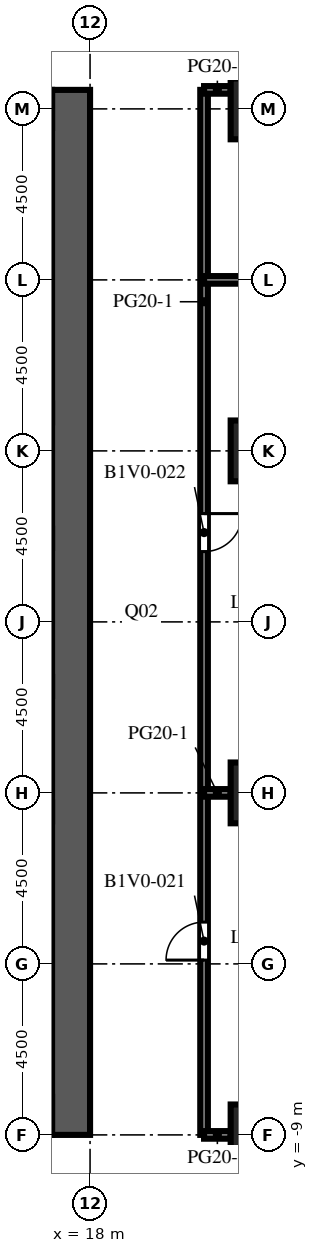
"""IFC4 building model, lengths in metres.
Left out: names, types, materials, properties, quantities, classifications, styles, units other than length and angle.
Written with IfcOpenShell. Run it as: python <this file> out.ifc"""

import sys

from ifc_helpers import new_model, si_unit, direction, frame, frame_2d, origin, origin_2d, place, context, subcontext, project, spatial, rectangle, extrude, element, fill, save


model = new_model("IFC4")
c1 = context("Model", 3, precision=1e-05, world=origin(), true_north=direction((0.0, 1.0)))
c2 = subcontext(c1, "Body", "Model", "MODEL_VIEW")
j1 = project(units=[si_unit("LENGTHUNIT", "METRE"), si_unit("PLANEANGLEUNIT", "RADIAN")], contexts=[c1])
p1 = place(None, origin())
s1 = spatial("IfcSite", under=j1, at=p1, CompositionType="ELEMENT")
p2 = place(p1, origin())
s2 = spatial("IfcBuilding", under=s1, at=p2, CompositionType="ELEMENT")
p3 = place(p2, frame((0.0, 0.0, 15.4)))
s3 = spatial("IfcBuildingStorey", under=s2, at=p3, CompositionType="ELEMENT", Elevation=15.4)
for number, where, z_axis, x_axis in (
    (1, (22.5, -9.0, 0.0), (0.0, 0.0, 1.0), (1.0, 0.0, 0.0)),
    (2, (22.5, 0.0, 0.0), (0.0, 0.0, 1.0), (1.0, 0.0, 0.0)),
    (3, (22.5, 9.0, 0.0), (0.0, 0.0, 1.0), (1.0, 0.0, 0.0)),
    (4, (22.5, 18.0, 0.0), (0.0, 0.0, 1.0), (1.0, 0.0, 0.0)),
):
    element("IfcColumn", number, at=place(p3, frame(where, z_axis=z_axis, x_axis=x_axis)), inside=s3, PredefinedType="COLUMN", context=c2, shape_type="SweptSolid", body=[
        extrude(rectangle(XDim=1.6, YDim=1.6, at=origin_2d()), origin(), (0.0, 0.0, 1.0), 4.1),
    ])
p4 = place(p3, frame((17.5, -9.0, 0.0), z_axis=(0.0, 0.0, 1.0), x_axis=(0.0, 1.0, 0.0)))
e5 = element("IfcWall", 5, at=p4, inside=s3, PredefinedType="SHEAR", context=c2, shape_type="SweptSolid", body=[
    extrude(rectangle(XDim=27.5, YDim=1.0, at=frame_2d((13.75, 0.0))), origin(), (0.0, 0.0, 1.0), 4.1),
])
p5 = place(p4, frame((12.55, 0.0, 0.0)))
e6 = element("IfcOpeningElement", 6, at=p5, cuts=e5, PredefinedType="OPENING", context=c2, shape_type="SweptSolid", body=[
    extrude(rectangle(XDim=2.4, YDim=2.4, at=frame_2d((1.2, 1.2))), frame((0.0, 0.51, 0.0), z_axis=(0.0, -1.0, 0.0), x_axis=(1.0, 0.0, 0.0)), (0.0, 0.0, 1.0), 1.02),
])
p6 = place(p4, frame((6.825, 0.0, 0.0)))
e7 = element("IfcOpeningElement", 7, at=p6, cuts=e5, PredefinedType="OPENING", context=c2, shape_type="SweptSolid", body=[
    extrude(rectangle(XDim=1.2, YDim=2.1, at=frame_2d((0.6, 1.05))), frame((0.0, 0.51, 0.0), z_axis=(0.0, -1.0, 0.0), x_axis=(1.0, 0.0, 0.0)), (0.0, 0.0, 1.0), 1.02),
])
p7 = place(p4, frame((19.475, 0.0, 0.0)))
e8 = element("IfcOpeningElement", 8, at=p7, cuts=e5, PredefinedType="OPENING", context=c2, shape_type="SweptSolid", body=[
    extrude(rectangle(XDim=1.2, YDim=2.1, at=frame_2d((0.6, 1.05))), frame((0.0, 0.51, 0.0), z_axis=(0.0, -1.0, 0.0), x_axis=(1.0, 0.0, 0.0)), (0.0, 0.0, 1.0), 1.02),
])
p8 = place(p3, frame((21.0, 18.5, 0.0), z_axis=(0.0, 0.0, 1.0), x_axis=(0.0, -1.0, 0.0)))
e9 = element("IfcWall", 9, at=p8, inside=s3, PredefinedType="PARTITIONING", context=c2, shape_type="SweptSolid", body=[
    extrude(rectangle(XDim=27.5, YDim=0.2, at=frame_2d((13.75, 0.0))), origin(), (0.0, 0.0, 1.0), 3.65),
])
p9 = place(p8, frame((21.9, 0.0, 0.0)))
e10 = element("IfcOpeningElement", 10, at=p9, cuts=e9, PredefinedType="OPENING", context=c2, shape_type="SweptSolid", body=[
    extrude(rectangle(XDim=1.0, YDim=2.1, at=frame_2d((0.5, 1.05))), frame((0.0, 0.11, 0.0), z_axis=(0.0, -1.0, 0.0), x_axis=(1.0, 0.0, 0.0)), (0.0, 0.0, 1.0), 0.22),
])
p10 = place(p8, frame((11.15, 0.0, 0.0)))
e11 = element("IfcOpeningElement", 11, at=p10, cuts=e9, PredefinedType="OPENING", context=c2, shape_type="SweptSolid", body=[
    extrude(rectangle(XDim=1.0, YDim=2.1, at=frame_2d((0.5, 1.05))), frame((0.0, 0.11, 0.0), z_axis=(0.0, -1.0, 0.0), x_axis=(1.0, 0.0, 0.0)), (0.0, 0.0, 1.0), 0.22),
])
for number, where, z_axis, x_axis in (
    (12, (21.0, -9.0, 0.0), (0.0, 0.0, 1.0), (1.0, 0.0, 0.0)),
    (13, (21.0, 0.0, 0.0), (0.0, 0.0, 1.0), (1.0, 0.0, 0.0)),
):
    element("IfcWall", number, at=place(p3, frame(where, z_axis=z_axis, x_axis=x_axis)), inside=s3, PredefinedType="PARTITIONING", context=c2, shape_type="SweptSolid", body=[
        extrude(rectangle(XDim=0.7, YDim=0.2, at=frame_2d((0.35, 0.0))), origin(), (0.0, 0.0, 1.0), 3.65),
    ])
p11 = place(p3, frame((21.0, 13.5, 0.0), z_axis=(0.0, 0.0, 1.0), x_axis=(1.0, 0.0, 0.0)))
e14 = element("IfcWall", 14, at=p11, inside=s3, PredefinedType="PARTITIONING", context=c2, shape_type="SweptSolid", body=[
    extrude(rectangle(XDim=5.3, YDim=0.2, at=frame_2d((2.65, 0.0))), origin(), (0.0, 0.0, 1.0), 3.65),
])
p12 = place(p3, frame((21.0, 18.5, 0.0), z_axis=(0.0, 0.0, 1.0), x_axis=(1.0, 0.0, 0.0)))
e15 = element("IfcWall", 15, at=p12, inside=s3, PredefinedType="PARTITIONING", context=c2, shape_type="SweptSolid", body=[
    extrude(rectangle(XDim=0.7, YDim=0.2, at=frame_2d((0.35, 0.0))), origin(), (0.0, 0.0, 1.0), 3.65),
])
p13 = place(p5, origin())
e16 = element("IfcDoor", 16, at=p13, inside=s3, OperationType="DOUBLE_DOOR_DOUBLE_SWING", PredefinedType="DOOR", context=c2, shape_type="SweptSolid", body=[
    extrude(rectangle(XDim=2.4, YDim=2.4, at=frame_2d((1.2, 1.2))), frame((0.0, 0.025, 0.0), z_axis=(0.0, -1.0, 0.0), x_axis=(1.0, 0.0, 0.0)), (0.0, 0.0, 1.0), 0.05),
])
fill(e6, e16)
p14 = place(p6, frame((1.2, 0.0, 0.0), z_axis=(0.0, 0.0, 1.0), x_axis=(-1.0, 0.0, 0.0)))
e17 = element("IfcDoor", 17, at=p14, inside=s3, OperationType="SINGLE_SWING_LEFT", PredefinedType="DOOR", context=c2, shape_type="SweptSolid", body=[
    extrude(rectangle(XDim=1.2, YDim=2.1, at=frame_2d((0.6, 1.05))), frame((0.0, 0.025, 0.0), z_axis=(0.0, -1.0, 0.0), x_axis=(1.0, 0.0, 0.0)), (0.0, 0.0, 1.0), 0.05),
])
fill(e7, e17)
p15 = place(p7, frame((1.2, 0.0, 0.0), z_axis=(0.0, 0.0, 1.0), x_axis=(-1.0, 0.0, 0.0)))
e18 = element("IfcDoor", 18, at=p15, inside=s3, OperationType="SINGLE_SWING_LEFT", PredefinedType="DOOR", context=c2, shape_type="SweptSolid", body=[
    extrude(rectangle(XDim=1.2, YDim=2.1, at=frame_2d((0.6, 1.05))), frame((0.0, 0.025, 0.0), z_axis=(0.0, -1.0, 0.0), x_axis=(1.0, 0.0, 0.0)), (0.0, 0.0, 1.0), 0.05),
])
fill(e8, e18)
p16 = place(p9, origin())
e19 = element("IfcDoor", 19, at=p16, inside=s3, OperationType="SINGLE_SWING_RIGHT", PredefinedType="DOOR", context=c2, shape_type="SweptSolid", body=[
    extrude(rectangle(XDim=1.0, YDim=2.1, at=frame_2d((0.5, 1.05))), frame((0.0, 0.025, 0.0), z_axis=(0.0, -1.0, 0.0), x_axis=(1.0, 0.0, 0.0)), (0.0, 0.0, 1.0), 0.05),
])
fill(e10, e19)
p17 = place(p10, origin())
e20 = element("IfcDoor", 20, at=p17, inside=s3, OperationType="SINGLE_SWING_LEFT", PredefinedType="DOOR", context=c2, shape_type="SweptSolid", body=[
    extrude(rectangle(XDim=1.0, YDim=2.1, at=frame_2d((0.5, 1.05))), frame((0.0, 0.025, 0.0), z_axis=(0.0, -1.0, 0.0), x_axis=(1.0, 0.0, 0.0)), (0.0, 0.0, 1.0), 0.05),
])
fill(e11, e20)
save(model, sys.argv[1])
